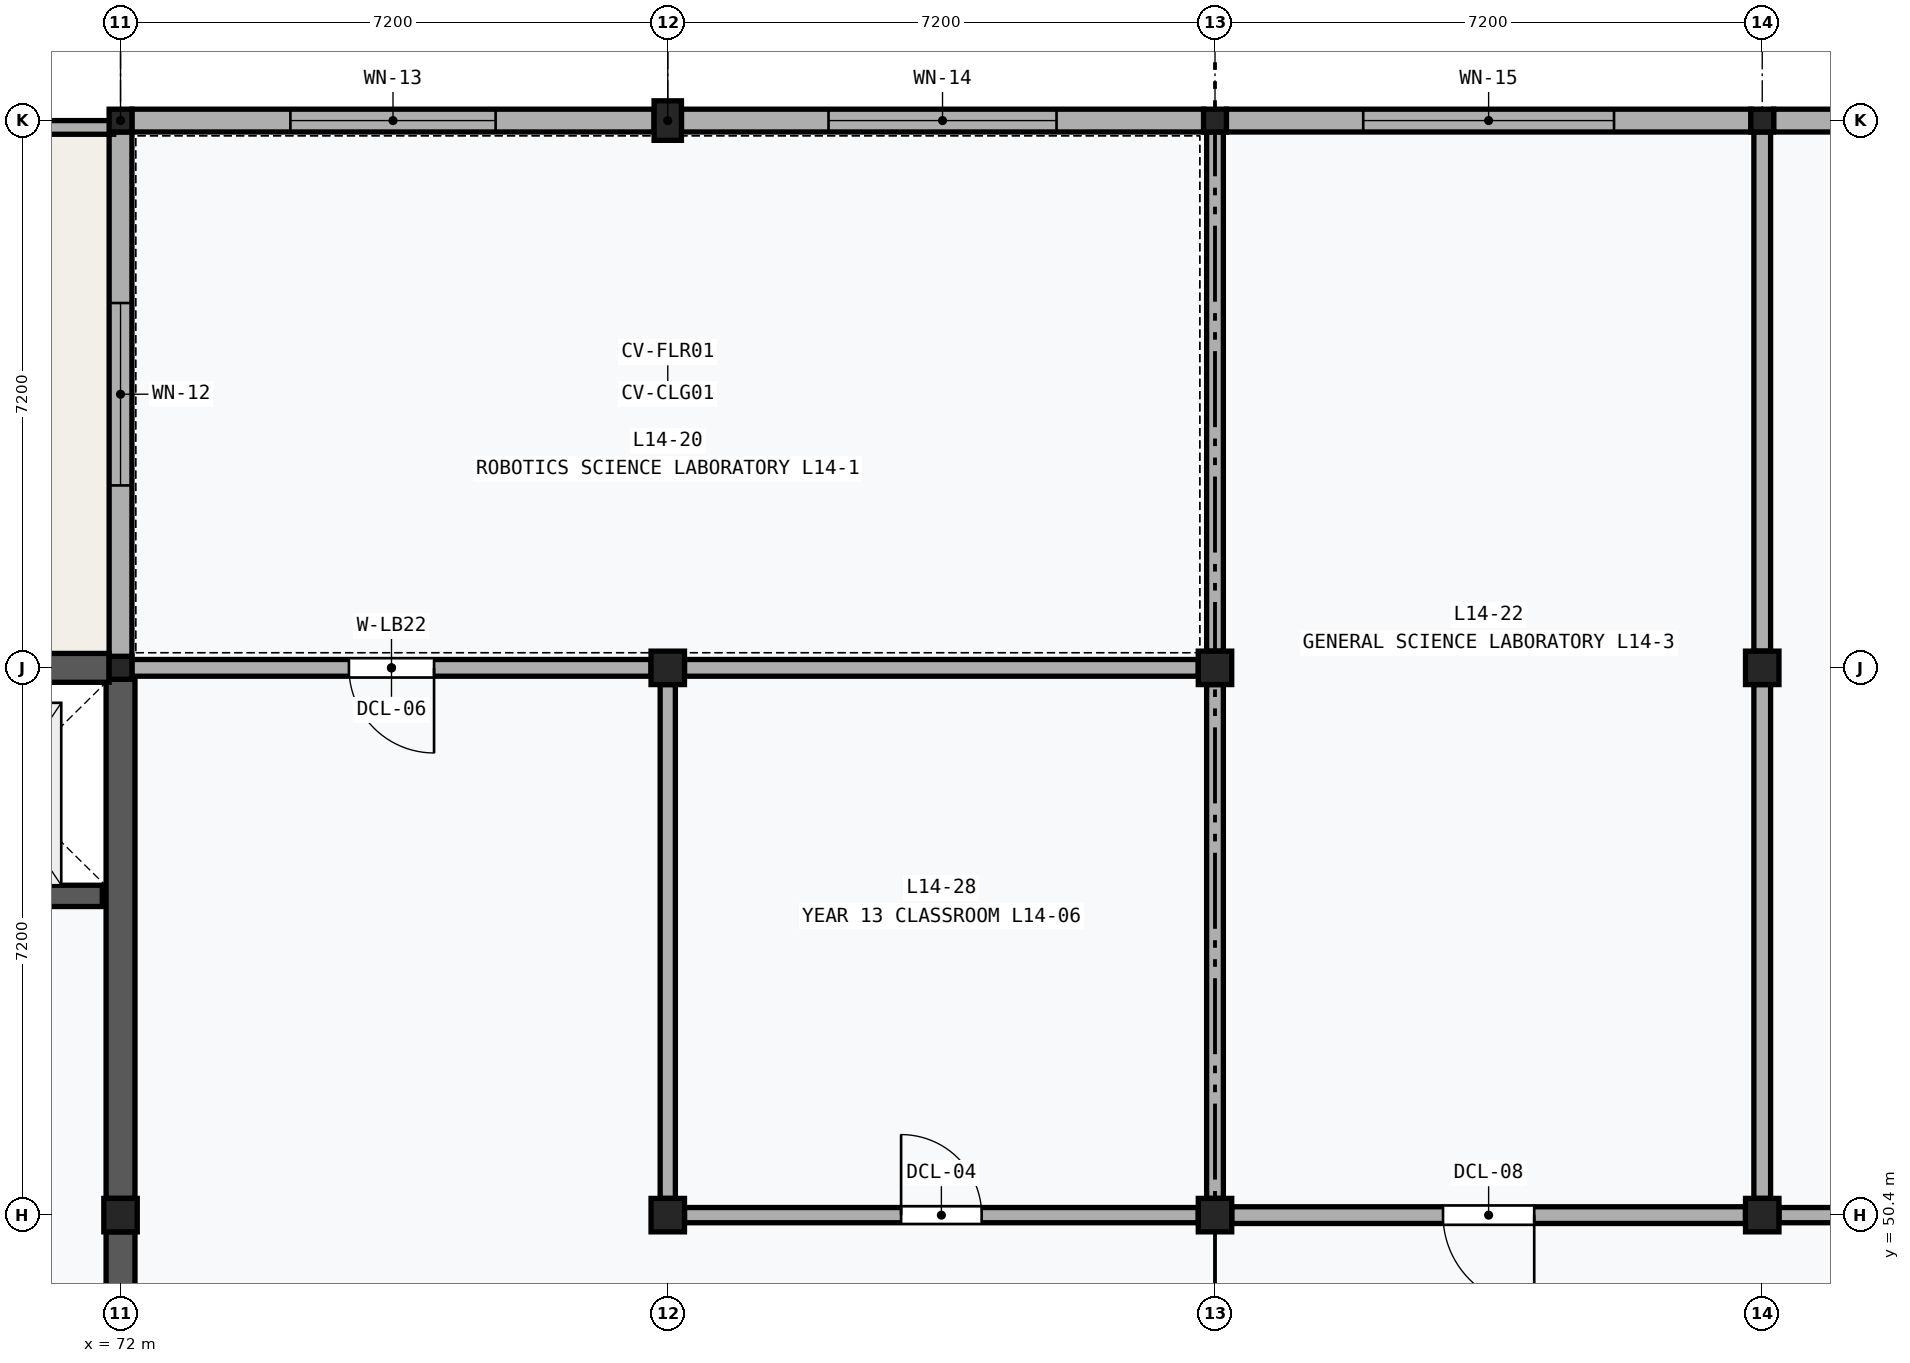
"""IFC4 building model, lengths in metres.
Left out: names, types, materials, properties, quantities, classifications, styles, units other than length and angle.
Written with IfcOpenShell. Run it as: python <this file> out.ifc"""

import sys

from ifc_helpers import new_model, si_unit, direction, frame, frame_2d, origin, origin_2d, place, context, subcontext, project, spatial, rectangle, extrude, element, fill, save


model = new_model("IFC4")
c1 = context("Model", 3, precision=1e-05, world=origin(), true_north=direction((0.0, 1.0)))
c2 = subcontext(c1, "Body", "Model", "MODEL_VIEW")
j1 = project(units=[si_unit("LENGTHUNIT", "METRE"), si_unit("PLANEANGLEUNIT", "RADIAN")], contexts=[c1])
p1 = place(None, origin())
s1 = spatial("IfcSite", under=j1, at=p1, CompositionType="ELEMENT")
p2 = place(p1, origin())
s2 = spatial("IfcBuilding", under=s1, at=p2, CompositionType="ELEMENT")
p3 = place(p2, frame((0.0, 0.0, 59.0)))
s3 = spatial("IfcBuildingStorey", under=s2, at=p3, CompositionType="ELEMENT", Elevation=59.0)
p4 = place(p3, frame((72.0, 50.4, 0.0), z_axis=(0.0, 0.0, 1.0), x_axis=(1.0, 0.0, 0.0)))
e1 = element("IfcColumn", 1, at=p4, inside=s3, PredefinedType="COLUMN", context=c2, shape_type="SweptSolid", body=[
    extrude(rectangle(XDim=0.44, YDim=0.44, at=origin_2d()), origin(), (0.0, 0.0, 1.0), 4.0),
])
for number, where, z_axis, x_axis in (
    (2, (72.0, 57.6, 0.0), (0.0, 0.0, 1.0), (1.0, 0.0, 0.0)),
    (3, (72.0, 64.8, 0.0), (0.0, 0.0, 1.0), (1.0, 0.0, 0.0)),
):
    element("IfcColumn", number, at=place(p3, frame(where, z_axis=z_axis, x_axis=x_axis)), inside=s3, PredefinedType="COLUMN", context=c2, shape_type="SweptSolid", body=[
        extrude(rectangle(XDim=0.3, YDim=0.3, at=origin_2d()), origin(), (0.0, 0.0, 1.0), 4.0),
    ])
for number, where, z_axis, x_axis in (
    (4, (79.2, 50.4, 0.0), (0.0, 0.0, 1.0), (1.0, 0.0, 0.0)),
    (5, (79.2, 57.6, 0.0), (0.0, 0.0, 1.0), (1.0, 0.0, 0.0)),
):
    element("IfcColumn", number, at=place(p3, frame(where, z_axis=z_axis, x_axis=x_axis)), inside=s3, PredefinedType="COLUMN", context=c2, shape_type="SweptSolid", body=[
        extrude(rectangle(XDim=0.44, YDim=0.44, at=origin_2d()), origin(), (0.0, 0.0, 1.0), 4.0),
    ])
p5 = place(p3, frame((79.2, 64.8, 0.0), z_axis=(0.0, 0.0, 1.0), x_axis=(1.0, 0.0, 0.0)))
e6 = element("IfcColumn", 6, at=p5, inside=s3, PredefinedType="PILASTER", context=c2, shape_type="SweptSolid", body=[
    extrude(rectangle(XDim=0.36, YDim=0.52, at=origin_2d()), origin(), (0.0, 0.0, 1.0), 4.0),
])
for number, where, z_axis, x_axis in (
    (7, (86.4, 50.4, 0.0), (0.0, 0.0, 1.0), (1.0, 0.0, 0.0)),
    (8, (86.4, 57.6, 0.0), (0.0, 0.0, 1.0), (1.0, 0.0, 0.0)),
):
    element("IfcColumn", number, at=place(p3, frame(where, z_axis=z_axis, x_axis=x_axis)), inside=s3, PredefinedType="COLUMN", context=c2, shape_type="SweptSolid", body=[
        extrude(rectangle(XDim=0.44, YDim=0.44, at=origin_2d()), origin(), (0.0, 0.0, 1.0), 4.0),
    ])
p6 = place(p3, frame((86.4, 64.8, 0.0), z_axis=(0.0, 0.0, 1.0), x_axis=(1.0, 0.0, 0.0)))
e9 = element("IfcColumn", 9, at=p6, inside=s3, PredefinedType="COLUMN", context=c2, shape_type="SweptSolid", body=[
    extrude(rectangle(XDim=0.3, YDim=0.3, at=origin_2d()), origin(), (0.0, 0.0, 1.0), 4.0),
])
for number, where, z_axis, x_axis in (
    (10, (93.6, 50.4, 0.0), (0.0, 0.0, 1.0), (1.0, 0.0, 0.0)),
    (11, (93.6, 57.6, 0.0), (0.0, 0.0, 1.0), (1.0, 0.0, 0.0)),
):
    element("IfcColumn", number, at=place(p3, frame(where, z_axis=z_axis, x_axis=x_axis)), inside=s3, PredefinedType="COLUMN", context=c2, shape_type="SweptSolid", body=[
        extrude(rectangle(XDim=0.44, YDim=0.44, at=origin_2d()), origin(), (0.0, 0.0, 1.0), 4.0),
    ])
p7 = place(p3, frame((93.6, 64.8, 0.0), z_axis=(0.0, 0.0, 1.0), x_axis=(1.0, 0.0, 0.0)))
e12 = element("IfcColumn", 12, at=p7, inside=s3, PredefinedType="COLUMN", context=c2, shape_type="SweptSolid", body=[
    extrude(rectangle(XDim=0.3, YDim=0.3, at=origin_2d()), origin(), (0.0, 0.0, 1.0), 4.0),
])
p8 = place(p3, frame((72.15, 64.8, 0.0), z_axis=(0.0, 0.0, 1.0), x_axis=(1.0, 0.0, 0.0)))
e13 = element("IfcWall", 13, at=p8, inside=s3, PredefinedType="SOLIDWALL", context=c2, shape_type="SweptSolid", body=[
    extrude(rectangle(XDim=6.87, YDim=0.3, at=frame_2d((3.435, 0.0))), origin(), (0.0, 0.0, 1.0), 3.19),
])
p9 = place(p8, frame((2.085, 0.0, 0.85)))
e14 = element("IfcOpeningElement", 14, at=p9, cuts=e13, PredefinedType="OPENING", context=c2, shape_type="SweptSolid", body=[
    extrude(rectangle(XDim=2.7, YDim=2.0, at=frame_2d((1.35, 1.0))), frame((0.0, 0.162, 0.0), z_axis=(0.0, -1.0, 0.0), x_axis=(1.0, 0.0, 0.0)), (0.0, 0.0, 1.0), 0.324),
])
p10 = place(p3, frame((72.0, 57.75, 0.0), z_axis=(0.0, 0.0, 1.0), x_axis=(0.0, 1.0, 0.0)))
e15 = element("IfcWall", 15, at=p10, inside=s3, PredefinedType="SOLIDWALL", context=c2, shape_type="SweptSolid", body=[
    extrude(rectangle(XDim=6.9, YDim=0.3, at=frame_2d((3.45, 0.0))), origin(), (0.0, 0.0, 1.0), 3.19),
])
p11 = place(p10, frame((2.25, 0.0, 0.85)))
e16 = element("IfcOpeningElement", 16, at=p11, cuts=e15, PredefinedType="OPENING", context=c2, shape_type="SweptSolid", body=[
    extrude(rectangle(XDim=2.4, YDim=2.0, at=frame_2d((1.2, 1.0))), frame((0.0, 0.162, 0.0), z_axis=(0.0, -1.0, 0.0), x_axis=(1.0, 0.0, 0.0)), (0.0, 0.0, 1.0), 0.324),
])
p12 = place(p3, frame((79.38, 64.8, 0.0), z_axis=(0.0, 0.0, 1.0), x_axis=(1.0, 0.0, 0.0)))
e17 = element("IfcWall", 17, at=p12, inside=s3, PredefinedType="SOLIDWALL", context=c2, shape_type="SweptSolid", body=[
    extrude(rectangle(XDim=6.87, YDim=0.3, at=frame_2d((3.435, 0.0))), origin(), (0.0, 0.0, 1.0), 3.19),
])
p13 = place(p12, frame((1.935, 0.0, 0.85)))
e18 = element("IfcOpeningElement", 18, at=p13, cuts=e17, PredefinedType="OPENING", context=c2, shape_type="SweptSolid", body=[
    extrude(rectangle(XDim=3.0, YDim=2.0, at=frame_2d((1.5, 1.0))), frame((0.0, 0.162, 0.0), z_axis=(0.0, -1.0, 0.0), x_axis=(1.0, 0.0, 0.0)), (0.0, 0.0, 1.0), 0.324),
])
p14 = place(p3, frame((86.55, 64.8, 0.0), z_axis=(0.0, 0.0, 1.0), x_axis=(1.0, 0.0, 0.0)))
e19 = element("IfcWall", 19, at=p14, inside=s3, PredefinedType="SOLIDWALL", context=c2, shape_type="SweptSolid", body=[
    extrude(rectangle(XDim=6.9, YDim=0.3, at=frame_2d((3.45, 0.0))), origin(), (0.0, 0.0, 1.0), 3.19),
])
p15 = place(p14, frame((1.8, 0.0, 0.85)))
e20 = element("IfcOpeningElement", 20, at=p15, cuts=e19, PredefinedType="OPENING", context=c2, shape_type="SweptSolid", body=[
    extrude(rectangle(XDim=3.3, YDim=2.0, at=frame_2d((1.65, 1.0))), frame((0.0, 0.162, 0.0), z_axis=(0.0, -1.0, 0.0), x_axis=(1.0, 0.0, 0.0)), (0.0, 0.0, 1.0), 0.324),
])
p16 = place(p3, frame((93.75, 64.8, 0.0), z_axis=(0.0, 0.0, 1.0), x_axis=(1.0, 0.0, 0.0)))
e21 = element("IfcWall", 21, at=p16, inside=s3, PredefinedType="SOLIDWALL", context=c2, shape_type="SweptSolid", body=[
    extrude(rectangle(XDim=6.9, YDim=0.3, at=frame_2d((3.45, 0.0))), origin(), (0.0, 0.0, 1.0), 3.19),
])
p17 = place(p16, frame((2.65, 0.0, 1.1)))
e22 = element("IfcOpeningElement", 22, at=p17, cuts=e21, PredefinedType="OPENING", context=c2, shape_type="SweptSolid", body=[
    extrude(rectangle(XDim=1.6, YDim=1.5, at=frame_2d((0.8, 0.75))), frame((0.0, 0.162, 0.0), z_axis=(0.0, -1.0, 0.0), x_axis=(1.0, 0.0, 0.0)), (0.0, 0.0, 1.0), 0.324),
])
p18 = place(p3, frame((64.89, 64.71, 0.0), z_axis=(0.0, 0.0, 1.0), x_axis=(1.0, 0.0, 0.0)))
e23 = element("IfcWall", 23, at=p18, inside=s3, PredefinedType="PARAPET", context=c2, shape_type="SweptSolid", body=[
    extrude(rectangle(XDim=7.02, YDim=0.18, at=frame_2d((3.51, 0.0))), origin(), (0.0, 0.0, 1.0), 0.95),
])
p19 = place(p3, frame((72.0, 43.42, 0.0), z_axis=(0.0, 0.0, 1.0), x_axis=(0.0, 1.0, 0.0)))
e24 = element("IfcWall", 24, at=p19, inside=s3, PredefinedType="SHEAR", context=c2, shape_type="SweptSolid", body=[
    extrude(rectangle(XDim=6.76, YDim=0.38, at=frame_2d((3.38, 0.0))), origin(), (0.0, 0.0, 1.0), 3.11),
])
p20 = place(p19, frame((2.2, 0.0, 0.0)))
e25 = element("IfcOpeningElement", 25, at=p20, cuts=e24, PredefinedType="OPENING", context=c2, shape_type="SweptSolid", body=[
    extrude(rectangle(XDim=1.7, YDim=2.25, at=frame_2d((0.85, 1.125))), frame((0.0, 0.202, 0.0), z_axis=(0.0, -1.0, 0.0), x_axis=(1.0, 0.0, 0.0)), (0.0, 0.0, 1.0), 0.404),
])
p21 = place(p3, frame((72.0, 50.62, 0.0), z_axis=(0.0, 0.0, 1.0), x_axis=(0.0, 1.0, 0.0)))
e26 = element("IfcWall", 26, at=p21, inside=s3, PredefinedType="SHEAR", context=c2, shape_type="SweptSolid", body=[
    extrude(rectangle(XDim=6.83, YDim=0.38, at=frame_2d((3.415, 0.0))), origin(), (0.0, 0.0, 1.0), 3.11),
])
p22 = place(p3, frame((64.95, 57.6, 0.0), z_axis=(0.0, 0.0, 1.0), x_axis=(1.0, 0.0, 0.0)))
e27 = element("IfcWall", 27, at=p22, inside=s3, PredefinedType="SHEAR", context=c2, shape_type="SweptSolid", body=[
    extrude(rectangle(XDim=6.9, YDim=0.38, at=frame_2d((3.45, 0.0))), origin(), (0.0, 0.0, 1.0), 3.19),
])
p23 = place(p3, frame((69.08, 54.6, 0.0), z_axis=(0.0, 0.0, 1.0), x_axis=(1.0, 0.0, 0.0)))
e28 = element("IfcWall", 28, at=p23, inside=s3, PredefinedType="SHEAR", context=c2, shape_type="SweptSolid", body=[
    extrude(rectangle(XDim=2.68, YDim=0.28, at=frame_2d((1.34, 0.0))), origin(), (0.0, 0.0, 1.0), 3.76),
])
p24 = place(p23, frame((0.765, 0.0, 0.0)))
e29 = element("IfcOpeningElement", 29, at=p24, cuts=e28, PredefinedType="OPENING", context=c2, shape_type="SweptSolid", body=[
    extrude(rectangle(XDim=1.15, YDim=2.2, at=frame_2d((0.575, 1.1))), frame((0.0, 0.152, 0.0), z_axis=(0.0, -1.0, 0.0), x_axis=(1.0, 0.0, 0.0)), (0.0, 0.0, 1.0), 0.304),
])
p25 = place(p3, frame((72.15, 57.6, 0.0), z_axis=(0.0, 0.0, 1.0), x_axis=(1.0, 0.0, 0.0)))
e30 = element("IfcWall", 30, at=p25, inside=s3, PredefinedType="PARTITIONING", context=c2, shape_type="SweptSolid", body=[
    extrude(rectangle(XDim=6.83, YDim=0.22, at=frame_2d((3.415, 0.0))), origin(), (0.0, 0.0, 1.0), 3.11),
])
p26 = place(p25, frame((2.855, 0.0, 0.0)))
e31 = element("IfcOpeningElement", 31, at=p26, cuts=e30, PredefinedType="OPENING", context=c2, shape_type="SweptSolid", body=[
    extrude(rectangle(XDim=1.12, YDim=2.2, at=frame_2d((0.56, 1.1))), frame((0.0, 0.122, 0.0), z_axis=(0.0, -1.0, 0.0), x_axis=(1.0, 0.0, 0.0)), (0.0, 0.0, 1.0), 0.244),
])
p27 = place(p3, frame((79.42, 57.6, 0.0), z_axis=(0.0, 0.0, 1.0), x_axis=(1.0, 0.0, 0.0)))
e32 = element("IfcWall", 32, at=p27, inside=s3, PredefinedType="PARTITIONING", context=c2, shape_type="SweptSolid", body=[
    extrude(rectangle(XDim=6.76, YDim=0.22, at=frame_2d((3.38, 0.0))), origin(), (0.0, 0.0, 1.0), 3.11),
])
p28 = place(p3, frame((86.4, 57.82, 0.0), z_axis=(0.0, 0.0, 1.0), x_axis=(0.0, 1.0, 0.0)))
e33 = element("IfcWall", 33, at=p28, inside=s3, PredefinedType="PARTITIONING", context=c2, shape_type="SweptSolid", body=[
    extrude(rectangle(XDim=6.83, YDim=0.22, at=frame_2d((3.415, 0.0))), origin(), (0.0, 0.0, 1.0), 3.11),
])
p29 = place(p3, frame((86.62, 50.4, 0.0), z_axis=(0.0, 0.0, 1.0), x_axis=(1.0, 0.0, 0.0)))
e34 = element("IfcWall", 34, at=p29, inside=s3, PredefinedType="PARTITIONING", context=c2, shape_type="SweptSolid", body=[
    extrude(rectangle(XDim=6.76, YDim=0.22, at=frame_2d((3.38, 0.0))), origin(), (0.0, 0.0, 1.0), 3.11),
])
p30 = place(p29, frame((2.78, 0.0, 0.0)))
e35 = element("IfcOpeningElement", 35, at=p30, cuts=e34, PredefinedType="OPENING", context=c2, shape_type="SweptSolid", body=[
    extrude(rectangle(XDim=1.2, YDim=2.24, at=frame_2d((0.6, 1.12))), frame((0.0, 0.122, 0.0), z_axis=(0.0, -1.0, 0.0), x_axis=(1.0, 0.0, 0.0)), (0.0, 0.0, 1.0), 0.244),
])
for number, where, z_axis, x_axis in (
    (36, (86.4, 50.62, 0.0), (0.0, 0.0, 1.0), (0.0, 1.0, 0.0)),
    (37, (93.6, 50.62, 0.0), (0.0, 0.0, 1.0), (0.0, 1.0, 0.0)),
):
    element("IfcWall", number, at=place(p3, frame(where, z_axis=z_axis, x_axis=x_axis)), inside=s3, PredefinedType="PARTITIONING", context=c2, shape_type="SweptSolid", body=[
        extrude(rectangle(XDim=6.76, YDim=0.22, at=frame_2d((3.38, 0.0))), origin(), (0.0, 0.0, 1.0), 3.11),
    ])
p31 = place(p3, frame((93.6, 57.82, 0.0), z_axis=(0.0, 0.0, 1.0), x_axis=(0.0, 1.0, 0.0)))
e38 = element("IfcWall", 38, at=p31, inside=s3, PredefinedType="PARTITIONING", context=c2, shape_type="SweptSolid", body=[
    extrude(rectangle(XDim=6.83, YDim=0.22, at=frame_2d((3.415, 0.0))), origin(), (0.0, 0.0, 1.0), 3.11),
])
p32 = place(p3, frame((93.82, 50.4, 0.0), z_axis=(0.0, 0.0, 1.0), x_axis=(1.0, 0.0, 0.0)))
e39 = element("IfcWall", 39, at=p32, inside=s3, PredefinedType="PARTITIONING", context=c2, shape_type="SweptSolid", body=[
    extrude(rectangle(XDim=6.76, YDim=0.2, at=frame_2d((3.38, 0.0))), origin(), (0.0, 0.0, 1.0), 3.11),
])
p33 = place(p32, frame((2.74, 0.0, 0.0)))
e40 = element("IfcOpeningElement", 40, at=p33, cuts=e39, PredefinedType="OPENING", context=c2, shape_type="SweptSolid", body=[
    extrude(rectangle(XDim=1.28, YDim=2.28, at=frame_2d((0.64, 1.14))), frame((0.0, 0.112, 0.0), z_axis=(0.0, -1.0, 0.0), x_axis=(1.0, 0.0, 0.0)), (0.0, 0.0, 1.0), 0.224),
])
p34 = place(p3, frame((79.42, 50.4, 0.0), z_axis=(0.0, 0.0, 1.0), x_axis=(1.0, 0.0, 0.0)))
e41 = element("IfcWall", 41, at=p34, inside=s3, PredefinedType="PARTITIONING", context=c2, shape_type="SweptSolid", body=[
    extrude(rectangle(XDim=6.76, YDim=0.2, at=frame_2d((3.38, 0.0))), origin(), (0.0, 0.0, 1.0), 3.11),
])
p35 = place(p34, frame((2.85, 0.0, 0.0)))
e42 = element("IfcOpeningElement", 42, at=p35, cuts=e41, PredefinedType="OPENING", context=c2, shape_type="SweptSolid", body=[
    extrude(rectangle(XDim=1.06, YDim=2.16, at=frame_2d((0.53, 1.08))), frame((0.0, 0.112, 0.0), z_axis=(0.0, -1.0, 0.0), x_axis=(1.0, 0.0, 0.0)), (0.0, 0.0, 1.0), 0.224),
])
p36 = place(p3, frame((79.2, 50.62, 0.0), z_axis=(0.0, 0.0, 1.0), x_axis=(0.0, 1.0, 0.0)))
e43 = element("IfcWall", 43, at=p36, inside=s3, PredefinedType="PARTITIONING", context=c2, shape_type="SweptSolid", body=[
    extrude(rectangle(XDim=6.76, YDim=0.2, at=frame_2d((3.38, 0.0))), origin(), (0.0, 0.0, 1.0), 3.11),
])
p37 = place(p9, origin())
e44 = element("IfcWindow", 44, at=p37, inside=s3, PartitioningType="SINGLE_PANEL", PredefinedType="WINDOW", context=c2, shape_type="SweptSolid", body=[
    extrude(rectangle(XDim=2.7, YDim=2.0, at=frame_2d((1.35, 1.0))), frame((0.0, 0.03, 0.0), z_axis=(0.0, -1.0, 0.0), x_axis=(1.0, 0.0, 0.0)), (0.0, 0.0, 1.0), 0.06),
])
fill(e14, e44)
p38 = place(p11, origin())
e45 = element("IfcWindow", 45, at=p38, inside=s3, PartitioningType="SINGLE_PANEL", PredefinedType="WINDOW", context=c2, shape_type="SweptSolid", body=[
    extrude(rectangle(XDim=2.4, YDim=2.0, at=frame_2d((1.2, 1.0))), frame((0.0, 0.03, 0.0), z_axis=(0.0, -1.0, 0.0), x_axis=(1.0, 0.0, 0.0)), (0.0, 0.0, 1.0), 0.06),
])
fill(e16, e45)
p39 = place(p13, origin())
e46 = element("IfcWindow", 46, at=p39, inside=s3, PartitioningType="SINGLE_PANEL", PredefinedType="WINDOW", context=c2, shape_type="SweptSolid", body=[
    extrude(rectangle(XDim=3.0, YDim=2.0, at=frame_2d((1.5, 1.0))), frame((0.0, 0.03, 0.0), z_axis=(0.0, -1.0, 0.0), x_axis=(1.0, 0.0, 0.0)), (0.0, 0.0, 1.0), 0.06),
])
fill(e18, e46)
p40 = place(p15, origin())
e47 = element("IfcWindow", 47, at=p40, inside=s3, PartitioningType="SINGLE_PANEL", PredefinedType="WINDOW", context=c2, shape_type="SweptSolid", body=[
    extrude(rectangle(XDim=3.3, YDim=2.0, at=frame_2d((1.65, 1.0))), frame((0.0, 0.03, 0.0), z_axis=(0.0, -1.0, 0.0), x_axis=(1.0, 0.0, 0.0)), (0.0, 0.0, 1.0), 0.06),
])
fill(e20, e47)
p41 = place(p26, frame((1.12, 0.0, 0.0), z_axis=(0.0, 0.0, 1.0), x_axis=(-1.0, 0.0, 0.0)))
e48 = element("IfcDoor", 48, at=p41, inside=s3, OperationType="SINGLE_SWING_LEFT", PredefinedType="DOOR", context=c2, shape_type="SweptSolid", body=[
    extrude(rectangle(XDim=1.12, YDim=2.2, at=frame_2d((0.56, 1.1))), frame((0.0, 0.025, 0.0), z_axis=(0.0, -1.0, 0.0), x_axis=(1.0, 0.0, 0.0)), (0.0, 0.0, 1.0), 0.05),
])
fill(e31, e48)
p42 = place(p30, frame((1.2, 0.0, 0.0), z_axis=(0.0, 0.0, 1.0), x_axis=(-1.0, 0.0, 0.0)))
e49 = element("IfcDoor", 49, at=p42, inside=s3, OperationType="SINGLE_SWING_LEFT", PredefinedType="DOOR", context=c2, shape_type="SweptSolid", body=[
    extrude(rectangle(XDim=1.2, YDim=2.24, at=frame_2d((0.6, 1.12))), frame((0.0, 0.025, 0.0), z_axis=(0.0, -1.0, 0.0), x_axis=(1.0, 0.0, 0.0)), (0.0, 0.0, 1.0), 0.05),
])
fill(e35, e49)
p43 = place(p35, origin())
e50 = element("IfcDoor", 50, at=p43, inside=s3, OperationType="SINGLE_SWING_LEFT", PredefinedType="DOOR", context=c2, shape_type="SweptSolid", body=[
    extrude(rectangle(XDim=1.06, YDim=2.16, at=frame_2d((0.53, 1.08))), frame((0.0, 0.025, 0.0), z_axis=(0.0, -1.0, 0.0), x_axis=(1.0, 0.0, 0.0)), (0.0, 0.0, 1.0), 0.05),
])
fill(e42, e50)
save(model, sys.argv[1])
